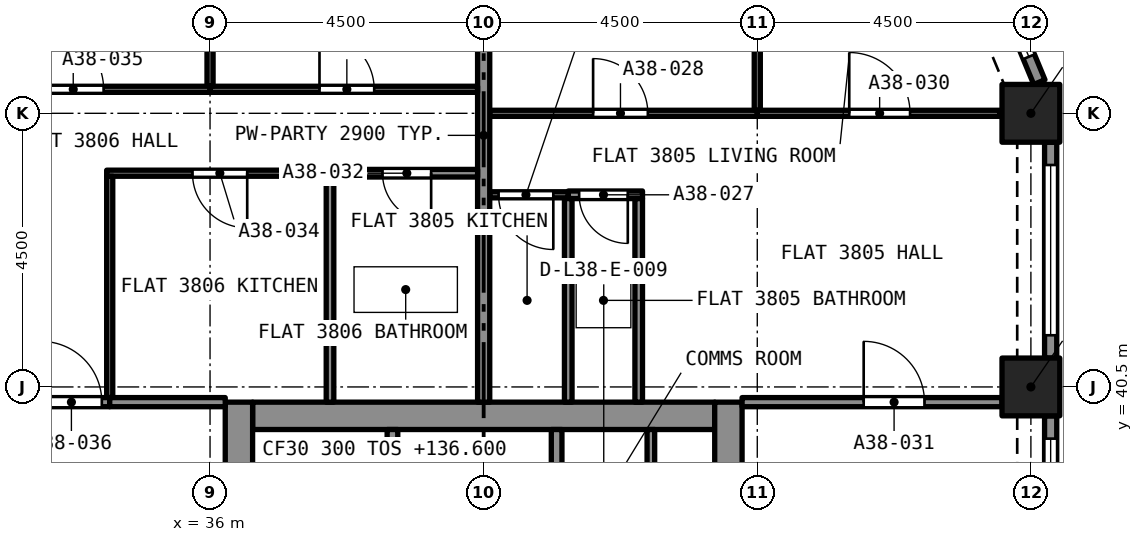
"""IFC4 building model, lengths in metres.
Left out: names, types, materials, properties, quantities, classifications, styles, units other than length and angle.
Written with IfcOpenShell. Run it as: python <this file> out.ifc"""

import sys

from ifc_helpers import new_model, si_unit, direction, frame, frame_2d, origin, origin_2d, place, context, subcontext, project, spatial, rectangle, extrude, element, fill, save


model = new_model("IFC4")
c1 = context("Model", 3, precision=1e-05, world=origin(), true_north=direction((0.0, 1.0)))
c2 = subcontext(c1, "Body", "Model", "MODEL_VIEW")
j1 = project(units=[si_unit("LENGTHUNIT", "METRE"), si_unit("PLANEANGLEUNIT", "RADIAN")], contexts=[c1])
p1 = place(None, origin())
s1 = spatial("IfcSite", under=j1, at=p1, CompositionType="ELEMENT")
p2 = place(p1, origin())
s2 = spatial("IfcBuilding", under=s1, at=p2, CompositionType="ELEMENT")
p3 = place(p2, frame((0.0, 0.0, 136.6)))
s3 = spatial("IfcBuildingStorey", under=s2, at=p3, CompositionType="ELEMENT", Elevation=136.6)
for number, where, z_axis, x_axis in (
    (1, (49.5, 40.5, 0.0), (0.0, 0.0, 1.0), (1.0, 0.0, 0.0)),
    (2, (49.5, 45.0, 0.0), (0.0, 0.0, 1.0), (1.0, 0.0, 0.0)),
):
    element("IfcColumn", number, at=place(p3, frame(where, z_axis=z_axis, x_axis=x_axis)), inside=s3, PredefinedType="COLUMN", context=c2, shape_type="SweptSolid", body=[
        extrude(rectangle(XDim=0.95, YDim=0.95, at=origin_2d()), origin(), (0.0, 0.0, 1.0), 3.2),
    ])
p4 = place(p3, frame((36.7, 40.025, 0.0), z_axis=(0.0, 0.0, 1.0), x_axis=(1.0, 0.0, 0.0)))
e3 = element("IfcWall", 3, at=p4, inside=s3, PredefinedType="SOLIDWALL", context=c2, shape_type="SweptSolid", body=[
    extrude(rectangle(XDim=7.6, YDim=0.45, at=frame_2d((3.8, 0.0))), origin(), (0.0, 0.0, 1.0), 3.2),
])
p5 = place(p3, frame((36.475, 27.25, 0.0), z_axis=(0.0, 0.0, 1.0), x_axis=(0.0, 1.0, 0.0)))
e4 = element("IfcWall", 4, at=p5, inside=s3, PredefinedType="SOLIDWALL", context=c2, shape_type="SweptSolid", body=[
    extrude(rectangle(XDim=13.0, YDim=0.45, at=frame_2d((6.5, 0.0))), origin(), (0.0, 0.0, 1.0), 3.2),
])
p6 = place(p5, frame((8.7, 0.0, 0.0)))
e5 = element("IfcOpeningElement", 5, at=p6, cuts=e4, PredefinedType="OPENING", context=c2, shape_type="SweptSolid", body=[
    extrude(rectangle(XDim=1.2, YDim=2.1, at=frame_2d((0.6, 1.05))), frame((0.0, 0.235, 0.0), z_axis=(0.0, -1.0, 0.0), x_axis=(1.0, 0.0, 0.0)), (0.0, 0.0, 1.0), 0.47),
])
p7 = place(p3, frame((44.525, 27.25, 0.0), z_axis=(0.0, 0.0, 1.0), x_axis=(0.0, 1.0, 0.0)))
e6 = element("IfcWall", 6, at=p7, inside=s3, PredefinedType="SOLIDWALL", context=c2, shape_type="SweptSolid", body=[
    extrude(rectangle(XDim=13.0, YDim=0.45, at=frame_2d((6.5, 0.0))), origin(), (0.0, 0.0, 1.0), 3.2),
])
p8 = place(p7, frame((8.7, 0.0, 0.0)))
e7 = element("IfcOpeningElement", 7, at=p8, cuts=e6, PredefinedType="OPENING", context=c2, shape_type="SweptSolid", body=[
    extrude(rectangle(XDim=1.2, YDim=2.1, at=frame_2d((0.6, 1.05))), frame((0.0, 0.235, 0.0), z_axis=(0.0, -1.0, 0.0), x_axis=(1.0, 0.0, 0.0)), (0.0, 0.0, 1.0), 0.47),
])
p9 = place(p3, frame((49.825, 40.025, 0.0), z_axis=(0.0, 0.0, 1.0), x_axis=(0.0, -1.0, 0.0)))
e8 = element("IfcWall", 8, at=p9, inside=s3, PredefinedType="SOLIDWALL", context=c2, shape_type="SweptSolid", body=[
    extrude(rectangle(XDim=3.55, YDim=0.2, at=frame_2d((1.775, 0.0))), origin(), (0.0, 0.0, 1.0), 3.2),
])
p10 = place(p9, frame((0.375, 0.0, 0.45)))
e9 = element("IfcOpeningElement", 9, at=p10, cuts=e8, PredefinedType="OPENING", context=c2, shape_type="SweptSolid", body=[
    extrude(rectangle(XDim=2.8, YDim=1.95, at=frame_2d((1.4, 0.975))), frame((0.0, 0.11, 0.0), z_axis=(0.0, -1.0, 0.0), x_axis=(1.0, 0.0, 0.0)), (0.0, 0.0, 1.0), 0.22),
])
p11 = place(p3, frame((49.825, 44.525, 0.0), z_axis=(0.0, 0.0, 1.0), x_axis=(0.0, -1.0, 0.0)))
e10 = element("IfcWall", 10, at=p11, inside=s3, PredefinedType="SOLIDWALL", context=c2, shape_type="SweptSolid", body=[
    extrude(rectangle(XDim=3.55, YDim=0.2, at=frame_2d((1.775, 0.0))), origin(), (0.0, 0.0, 1.0), 3.2),
])
p12 = place(p11, frame((0.375, 0.0, 0.45)))
e11 = element("IfcOpeningElement", 11, at=p12, cuts=e10, PredefinedType="OPENING", context=c2, shape_type="SweptSolid", body=[
    extrude(rectangle(XDim=2.8, YDim=1.95, at=frame_2d((1.4, 0.975))), frame((0.0, 0.11, 0.0), z_axis=(0.0, -1.0, 0.0), x_axis=(1.0, 0.0, 0.0)), (0.0, 0.0, 1.0), 0.22),
])
p13 = place(p3, frame((48.72, 47.733, 0.0), z_axis=(0.0, 0.0, 1.0), x_axis=(0.382680855588, -0.923880599843, 0.0)))
e12 = element("IfcWall", 12, at=p13, inside=s3, PredefinedType="SOLIDWALL", context=c2, shape_type="SweptSolid", body=[
    extrude(rectangle(XDim=2.403, YDim=0.2, at=frame_2d((1.201, 0.0))), origin(), (0.0, 0.0, 1.0), 3.2),
])
p14 = place(p13, frame((0.251, 0.0, 0.45)))
e13 = element("IfcOpeningElement", 13, at=p14, cuts=e12, PredefinedType="OPENING", context=c2, shape_type="SweptSolid", body=[
    extrude(rectangle(XDim=1.7, YDim=1.95, at=frame_2d((0.85, 0.975))), frame((0.0, 0.11, 0.0), z_axis=(0.0, -1.0, 0.0), x_axis=(1.0, 0.0, 0.0)), (0.0, 0.0, 1.0), 0.22),
])
p15 = place(p3, frame((43.113, 43.66, 0.0), z_axis=(0.0, 0.0, 1.0), x_axis=(-1.0, 0.0, 0.0)))
e14 = element("IfcWall", 14, at=p15, inside=s3, PredefinedType="PARTITIONING", context=c2, shape_type="SweptSolid", body=[
    extrude(rectangle(XDim=1.222, YDim=0.125, at=frame_2d((0.611, 0.0))), origin(), (0.0, 0.0, 1.0), 2.9),
])
p16 = place(p15, frame((0.242, 0.0, 0.0)))
e15 = element("IfcOpeningElement", 15, at=p16, cuts=e14, PredefinedType="OPENING", context=c2, shape_type="SweptSolid", body=[
    extrude(rectangle(XDim=0.8, YDim=2.1, at=frame_2d((0.4, 1.05))), frame((0.0, 0.073, 0.0), z_axis=(0.0, -1.0, 0.0), x_axis=(1.0, 0.0, 0.0)), (0.0, 0.0, 1.0), 0.145),
])
for number, where, z_axis, x_axis in (
    (16, (43.05, 40.25, 0.0), (0.0, 0.0, 1.0), (0.0, 1.0, 0.0)),
    (17, (41.891, 40.25, 0.0), (0.0, 0.0, 1.0), (0.0, 1.0, 0.0)),
):
    element("IfcWall", number, at=place(p3, frame(where, z_axis=z_axis, x_axis=x_axis)), inside=s3, PredefinedType="PARTITIONING", context=c2, shape_type="SweptSolid", body=[
        extrude(rectangle(XDim=3.347, YDim=0.125, at=frame_2d((1.674, 0.0))), origin(), (0.0, 0.0, 1.0), 2.9),
    ])
p17 = place(p3, frame((40.6, 45.0, 0.0), z_axis=(0.0, 0.0, 1.0), x_axis=(1.0, 0.0, 0.0)))
e18 = element("IfcWall", 18, at=p17, inside=s3, PredefinedType="PARTITIONING", context=c2, shape_type="SweptSolid", body=[
    extrude(rectangle(XDim=4.4, YDim=0.1, at=frame_2d((2.2, 0.0))), origin(), (0.0, 0.0, 1.0), 2.9),
])
p18 = place(p17, frame((1.7, 0.0, 0.0)))
e19 = element("IfcOpeningElement", 19, at=p18, cuts=e18, PredefinedType="OPENING", context=c2, shape_type="SweptSolid", body=[
    extrude(rectangle(XDim=0.9, YDim=2.1, at=frame_2d((0.45, 1.05))), frame((0.0, 0.06, 0.0), z_axis=(0.0, -1.0, 0.0), x_axis=(1.0, 0.0, 0.0)), (0.0, 0.0, 1.0), 0.12),
])
p19 = place(p3, frame((45.0, 45.05, 0.0), z_axis=(0.0, 0.0, 1.0), x_axis=(0.0, 1.0, 0.0)))
e20 = element("IfcWall", 20, at=p19, inside=s3, PredefinedType="PARTITIONING", context=c2, shape_type="SweptSolid", body=[
    extrude(rectangle(XDim=3.936, YDim=0.1, at=frame_2d((1.968, 0.0))), origin(), (0.0, 0.0, 1.0), 2.9),
])
p20 = place(p3, frame((41.891, 43.66, 0.0), z_axis=(0.0, 0.0, 1.0), x_axis=(-1.0, 0.0, 0.0)))
e21 = element("IfcWall", 21, at=p20, inside=s3, PredefinedType="PARTITIONING", context=c2, shape_type="SweptSolid", body=[
    extrude(rectangle(XDim=1.291, YDim=0.1, at=frame_2d((0.646, 0.0))), origin(), (0.0, 0.0, 1.0), 2.9),
])
p21 = place(p20, frame((0.246, 0.0, 0.0)))
e22 = element("IfcOpeningElement", 22, at=p21, cuts=e21, PredefinedType="OPENING", context=c2, shape_type="SweptSolid", body=[
    extrude(rectangle(XDim=0.9, YDim=2.1, at=frame_2d((0.45, 1.05))), frame((0.0, 0.06, 0.0), z_axis=(0.0, -1.0, 0.0), x_axis=(1.0, 0.0, 0.0)), (0.0, 0.0, 1.0), 0.12),
])
p22 = place(p3, frame((45.0, 45.0, 0.0), z_axis=(0.0, 0.0, 1.0), x_axis=(1.0, 0.0, 0.0)))
e23 = element("IfcWall", 23, at=p22, inside=s3, PredefinedType="PARTITIONING", context=c2, shape_type="SweptSolid", body=[
    extrude(rectangle(XDim=3.986, YDim=0.1, at=frame_2d((1.993, 0.0))), origin(), (0.0, 0.0, 1.0), 2.9),
])
p23 = place(p22, frame((1.512, 0.0, 0.0)))
e24 = element("IfcOpeningElement", 24, at=p23, cuts=e23, PredefinedType="OPENING", context=c2, shape_type="SweptSolid", body=[
    extrude(rectangle(XDim=1.0, YDim=2.1, at=frame_2d((0.5, 1.05))), frame((0.0, 0.06, 0.0), z_axis=(0.0, -1.0, 0.0), x_axis=(1.0, 0.0, 0.0)), (0.0, 0.0, 1.0), 0.12),
])
p24 = place(p3, frame((44.75, 40.25, 0.0), z_axis=(0.0, 0.0, 1.0), x_axis=(1.0, 0.0, 0.0)))
e25 = element("IfcWall", 25, at=p24, inside=s3, PredefinedType="PARTITIONING", context=c2, shape_type="SweptSolid", body=[
    extrude(rectangle(XDim=4.275, YDim=0.15, at=frame_2d((2.137, 0.0))), origin(), (0.0, 0.0, 1.0), 2.9),
])
p25 = place(p24, frame((2.0, 0.0, 0.0)))
e26 = element("IfcOpeningElement", 26, at=p25, cuts=e25, PredefinedType="OPENING", context=c2, shape_type="SweptSolid", body=[
    extrude(rectangle(XDim=1.0, YDim=2.1, at=frame_2d((0.5, 1.05))), frame((0.0, 0.085, 0.0), z_axis=(0.0, -1.0, 0.0), x_axis=(1.0, 0.0, 0.0)), (0.0, 0.0, 1.0), 0.17),
])
p26 = place(p3, frame((40.5, 40.25, 0.0), z_axis=(0.0, 0.0, 1.0), x_axis=(0.0, 1.0, 0.0)))
e27 = element("IfcWall", 27, at=p26, inside=s3, PredefinedType="PARTITIONING", context=c2, shape_type="SweptSolid", body=[
    extrude(rectangle(XDim=8.775, YDim=0.2, at=frame_2d((4.387, 0.0))), origin(), (0.0, 0.0, 1.0), 2.9),
])
p27 = place(p3, frame((40.4, 44.015, 0.0), z_axis=(0.0, 0.0, 1.0), x_axis=(-1.0, 0.0, 0.0)))
e28 = element("IfcWall", 28, at=p27, inside=s3, PredefinedType="PARTITIONING", context=c2, shape_type="SweptSolid", body=[
    extrude(rectangle(XDim=2.427, YDim=0.125, at=frame_2d((1.214, 0.0))), origin(), (0.0, 0.0, 1.0), 2.9),
])
p28 = place(p27, frame((0.764, 0.0, 0.0)))
e29 = element("IfcOpeningElement", 29, at=p28, cuts=e28, PredefinedType="OPENING", context=c2, shape_type="SweptSolid", body=[
    extrude(rectangle(XDim=0.8, YDim=2.1, at=frame_2d((0.4, 1.05))), frame((0.0, 0.073, 0.0), z_axis=(0.0, -1.0, 0.0), x_axis=(1.0, 0.0, 0.0)), (0.0, 0.0, 1.0), 0.145),
])
p29 = place(p3, frame((37.973, 40.25, 0.0), z_axis=(0.0, 0.0, 1.0), x_axis=(0.0, 1.0, 0.0)))
e30 = element("IfcWall", 30, at=p29, inside=s3, PredefinedType="PARTITIONING", context=c2, shape_type="SweptSolid", body=[
    extrude(rectangle(XDim=3.702, YDim=0.125, at=frame_2d((1.851, 0.0))), origin(), (0.0, 0.0, 1.0), 2.9),
])
p30 = place(p3, frame((36.0, 45.395, 0.0), z_axis=(0.0, 0.0, 1.0), x_axis=(1.0, 0.0, 0.0)))
e31 = element("IfcWall", 31, at=p30, inside=s3, PredefinedType="PARTITIONING", context=c2, shape_type="SweptSolid", body=[
    extrude(rectangle(XDim=4.4, YDim=0.1, at=frame_2d((2.2, 0.0))), origin(), (0.0, 0.0, 1.0), 2.9),
])
p31 = place(p30, frame((1.8, 0.0, 0.0)))
e32 = element("IfcOpeningElement", 32, at=p31, cuts=e31, PredefinedType="OPENING", context=c2, shape_type="SweptSolid", body=[
    extrude(rectangle(XDim=0.9, YDim=2.1, at=frame_2d((0.45, 1.05))), frame((0.0, 0.06, 0.0), z_axis=(0.0, -1.0, 0.0), x_axis=(1.0, 0.0, 0.0)), (0.0, 0.0, 1.0), 0.12),
])
p32 = place(p3, frame((36.0, 45.445, 0.0), z_axis=(0.0, 0.0, 1.0), x_axis=(0.0, 1.0, 0.0)))
e33 = element("IfcWall", 33, at=p32, inside=s3, PredefinedType="PARTITIONING", context=c2, shape_type="SweptSolid", body=[
    extrude(rectangle(XDim=3.58, YDim=0.1, at=frame_2d((1.79, 0.0))), origin(), (0.0, 0.0, 1.0), 2.9),
])
p33 = place(p3, frame((37.973, 44.015, 0.0), z_axis=(0.0, 0.0, 1.0), x_axis=(-1.0, 0.0, 0.0)))
e34 = element("IfcWall", 34, at=p33, inside=s3, PredefinedType="PARTITIONING", context=c2, shape_type="SweptSolid", body=[
    extrude(rectangle(XDim=3.673, YDim=0.1, at=frame_2d((1.836, 0.0))), origin(), (0.0, 0.0, 1.0), 2.9),
])
p34 = place(p33, frame((1.361, 0.0, 0.0)))
e35 = element("IfcOpeningElement", 35, at=p34, cuts=e34, PredefinedType="OPENING", context=c2, shape_type="SweptSolid", body=[
    extrude(rectangle(XDim=0.9, YDim=2.1, at=frame_2d((0.45, 1.05))), frame((0.0, 0.06, 0.0), z_axis=(0.0, -1.0, 0.0), x_axis=(1.0, 0.0, 0.0)), (0.0, 0.0, 1.0), 0.12),
])
p35 = place(p3, frame((34.35, 40.325, 0.0), z_axis=(0.0, 0.0, 1.0), x_axis=(0.0, 1.0, 0.0)))
e36 = element("IfcWall", 36, at=p35, inside=s3, PredefinedType="PARTITIONING", context=c2, shape_type="SweptSolid", body=[
    extrude(rectangle(XDim=3.64, YDim=0.1, at=frame_2d((1.82, 0.0))), origin(), (0.0, 0.0, 1.0), 2.9),
])
p36 = place(p3, frame((31.975, 45.395, 0.0), z_axis=(0.0, 0.0, 1.0), x_axis=(1.0, 0.0, 0.0)))
e37 = element("IfcWall", 37, at=p36, inside=s3, PredefinedType="PARTITIONING", context=c2, shape_type="SweptSolid", body=[
    extrude(rectangle(XDim=4.025, YDim=0.1, at=frame_2d((2.012, 0.0))), origin(), (0.0, 0.0, 1.0), 2.9),
])
p37 = place(p36, frame((1.275, 0.0, 0.0)))
e38 = element("IfcOpeningElement", 38, at=p37, cuts=e37, PredefinedType="OPENING", context=c2, shape_type="SweptSolid", body=[
    extrude(rectangle(XDim=1.0, YDim=2.1, at=frame_2d((0.5, 1.05))), frame((0.0, 0.06, 0.0), z_axis=(0.0, -1.0, 0.0), x_axis=(1.0, 0.0, 0.0)), (0.0, 0.0, 1.0), 0.12),
])
p38 = place(p3, frame((31.975, 40.25, 0.0), z_axis=(0.0, 0.0, 1.0), x_axis=(1.0, 0.0, 0.0)))
e39 = element("IfcWall", 39, at=p38, inside=s3, PredefinedType="PARTITIONING", context=c2, shape_type="SweptSolid", body=[
    extrude(rectangle(XDim=2.375, YDim=0.15, at=frame_2d((1.188, 0.0))), origin(), (0.0, 0.0, 1.0), 2.9),
])
p39 = place(p38, frame((1.245, 0.0, 0.0)))
e40 = element("IfcOpeningElement", 40, at=p39, cuts=e39, PredefinedType="OPENING", context=c2, shape_type="SweptSolid", body=[
    extrude(rectangle(XDim=1.0, YDim=2.1, at=frame_2d((0.5, 1.05))), frame((0.0, 0.085, 0.0), z_axis=(0.0, -1.0, 0.0), x_axis=(1.0, 0.0, 0.0)), (0.0, 0.0, 1.0), 0.17),
])
p40 = place(p3, frame((34.35, 40.25, 0.0), z_axis=(0.0, 0.0, 1.0), x_axis=(1.0, 0.0, 0.0)))
e41 = element("IfcWall", 41, at=p40, inside=s3, PredefinedType="PARTITIONING", context=c2, shape_type="SweptSolid", body=[
    extrude(rectangle(XDim=1.9, YDim=0.15, at=frame_2d((0.95, 0.0))), origin(), (0.0, 0.0, 1.0), 2.9),
])
for number, where, z_axis, x_axis in (
    (42, (41.7, 37.5, 0.0), (0.0, 0.0, 1.0), (0.0, 1.0, 0.0)),
    (43, (39.0, 37.5, 0.0), (0.0, 0.0, 1.0), (0.0, 1.0, 0.0)),
):
    element("IfcWall", number, at=place(p3, frame(where, z_axis=z_axis, x_axis=x_axis)), inside=s3, PredefinedType="SOLIDWALL", context=c2, shape_type="SweptSolid", body=[
        extrude(rectangle(XDim=2.3, YDim=0.175, at=frame_2d((1.15, 0.0))), origin(), (0.0, 0.0, 1.0), 2.9),
    ])
p41 = place(p3, frame((43.25, 37.5, 0.0), z_axis=(0.0, 0.0, 1.0), x_axis=(0.0, 1.0, 0.0)))
e44 = element("IfcWall", 44, at=p41, inside=s3, PredefinedType="PARTITIONING", context=c2, shape_type="SweptSolid", body=[
    extrude(rectangle(XDim=2.3, YDim=0.125, at=frame_2d((1.15, 0.0))), origin(), (0.0, 0.0, 1.0), 2.9),
])
p42 = place(p10, origin())
e45 = element("IfcWindow", 45, at=p42, inside=s3, PartitioningType="SINGLE_PANEL", PredefinedType="WINDOW", context=c2, shape_type="SweptSolid", body=[
    extrude(rectangle(XDim=2.8, YDim=1.95, at=frame_2d((1.4, 0.975))), frame((0.0, 0.03, 0.0), z_axis=(0.0, -1.0, 0.0), x_axis=(1.0, 0.0, 0.0)), (0.0, 0.0, 1.0), 0.06),
])
fill(e9, e45)
p43 = place(p12, origin())
e46 = element("IfcWindow", 46, at=p43, inside=s3, PartitioningType="SINGLE_PANEL", PredefinedType="WINDOW", context=c2, shape_type="SweptSolid", body=[
    extrude(rectangle(XDim=2.8, YDim=1.95, at=frame_2d((1.4, 0.975))), frame((0.0, 0.03, 0.0), z_axis=(0.0, -1.0, 0.0), x_axis=(1.0, 0.0, 0.0)), (0.0, 0.0, 1.0), 0.06),
])
fill(e11, e46)
p44 = place(p14, origin())
e47 = element("IfcWindow", 47, at=p44, inside=s3, PartitioningType="SINGLE_PANEL", PredefinedType="WINDOW", context=c2, shape_type="SweptSolid", body=[
    extrude(rectangle(XDim=1.7, YDim=1.95, at=frame_2d((0.85, 0.975))), frame((0.0, 0.03, 0.0), z_axis=(0.0, -1.0, 0.0), x_axis=(1.0, 0.0, 0.0)), (0.0, 0.0, 1.0), 0.06),
])
fill(e13, e47)
p45 = place(p16, origin())
e48 = element("IfcDoor", 48, at=p45, inside=s3, OperationType="SINGLE_SWING_RIGHT", PredefinedType="DOOR", context=c2, shape_type="SweptSolid", body=[
    extrude(rectangle(XDim=0.8, YDim=2.1, at=frame_2d((0.4, 1.05))), frame((0.0, 0.025, 0.0), z_axis=(0.0, -1.0, 0.0), x_axis=(1.0, 0.0, 0.0)), (0.0, 0.0, 1.0), 0.05),
])
fill(e15, e48)
p46 = place(p18, origin())
e49 = element("IfcDoor", 49, at=p46, inside=s3, OperationType="SINGLE_SWING_LEFT", PredefinedType="DOOR", context=c2, shape_type="SweptSolid", body=[
    extrude(rectangle(XDim=0.9, YDim=2.1, at=frame_2d((0.45, 1.05))), frame((0.0, 0.025, 0.0), z_axis=(0.0, -1.0, 0.0), x_axis=(1.0, 0.0, 0.0)), (0.0, 0.0, 1.0), 0.05),
])
fill(e19, e49)
p47 = place(p21, origin())
e50 = element("IfcDoor", 50, at=p47, inside=s3, OperationType="SINGLE_SWING_RIGHT", PredefinedType="DOOR", context=c2, shape_type="SweptSolid", body=[
    extrude(rectangle(XDim=0.9, YDim=2.1, at=frame_2d((0.45, 1.05))), frame((0.0, 0.025, 0.0), z_axis=(0.0, -1.0, 0.0), x_axis=(1.0, 0.0, 0.0)), (0.0, 0.0, 1.0), 0.05),
])
fill(e22, e50)
p48 = place(p23, origin())
e51 = element("IfcDoor", 51, at=p48, inside=s3, OperationType="SINGLE_SWING_RIGHT", PredefinedType="DOOR", context=c2, shape_type="SweptSolid", body=[
    extrude(rectangle(XDim=1.0, YDim=2.1, at=frame_2d((0.5, 1.05))), frame((0.0, 0.025, 0.0), z_axis=(0.0, -1.0, 0.0), x_axis=(1.0, 0.0, 0.0)), (0.0, 0.0, 1.0), 0.05),
])
fill(e24, e51)
p49 = place(p25, origin())
e52 = element("IfcDoor", 52, at=p49, inside=s3, OperationType="SINGLE_SWING_RIGHT", PredefinedType="DOOR", context=c2, shape_type="SweptSolid", body=[
    extrude(rectangle(XDim=1.0, YDim=2.1, at=frame_2d((0.5, 1.05))), frame((0.0, 0.025, 0.0), z_axis=(0.0, -1.0, 0.0), x_axis=(1.0, 0.0, 0.0)), (0.0, 0.0, 1.0), 0.05),
])
fill(e26, e52)
p50 = place(p28, origin())
e53 = element("IfcDoor", 53, at=p50, inside=s3, OperationType="SINGLE_SWING_LEFT", PredefinedType="DOOR", context=c2, shape_type="SweptSolid", body=[
    extrude(rectangle(XDim=0.8, YDim=2.1, at=frame_2d((0.4, 1.05))), frame((0.0, 0.025, 0.0), z_axis=(0.0, -1.0, 0.0), x_axis=(1.0, 0.0, 0.0)), (0.0, 0.0, 1.0), 0.05),
])
fill(e29, e53)
p51 = place(p31, origin())
e54 = element("IfcDoor", 54, at=p51, inside=s3, OperationType="SINGLE_SWING_RIGHT", PredefinedType="DOOR", context=c2, shape_type="SweptSolid", body=[
    extrude(rectangle(XDim=0.9, YDim=2.1, at=frame_2d((0.45, 1.05))), frame((0.0, 0.025, 0.0), z_axis=(0.0, -1.0, 0.0), x_axis=(1.0, 0.0, 0.0)), (0.0, 0.0, 1.0), 0.05),
])
fill(e32, e54)
p52 = place(p34, origin())
e55 = element("IfcDoor", 55, at=p52, inside=s3, OperationType="SINGLE_SWING_LEFT", PredefinedType="DOOR", context=c2, shape_type="SweptSolid", body=[
    extrude(rectangle(XDim=0.9, YDim=2.1, at=frame_2d((0.45, 1.05))), frame((0.0, 0.025, 0.0), z_axis=(0.0, -1.0, 0.0), x_axis=(1.0, 0.0, 0.0)), (0.0, 0.0, 1.0), 0.05),
])
fill(e35, e55)
p53 = place(p37, origin())
e56 = element("IfcDoor", 56, at=p53, inside=s3, OperationType="SINGLE_SWING_LEFT", PredefinedType="DOOR", context=c2, shape_type="SweptSolid", body=[
    extrude(rectangle(XDim=1.0, YDim=2.1, at=frame_2d((0.5, 1.05))), frame((0.0, 0.025, 0.0), z_axis=(0.0, -1.0, 0.0), x_axis=(1.0, 0.0, 0.0)), (0.0, 0.0, 1.0), 0.05),
])
fill(e38, e56)
p54 = place(p39, origin())
e57 = element("IfcDoor", 57, at=p54, inside=s3, OperationType="SINGLE_SWING_RIGHT", PredefinedType="DOOR", context=c2, shape_type="SweptSolid", body=[
    extrude(rectangle(XDim=1.0, YDim=2.1, at=frame_2d((0.5, 1.05))), frame((0.0, 0.025, 0.0), z_axis=(0.0, -1.0, 0.0), x_axis=(1.0, 0.0, 0.0)), (0.0, 0.0, 1.0), 0.05),
])
fill(e40, e57)
save(model, sys.argv[1])
